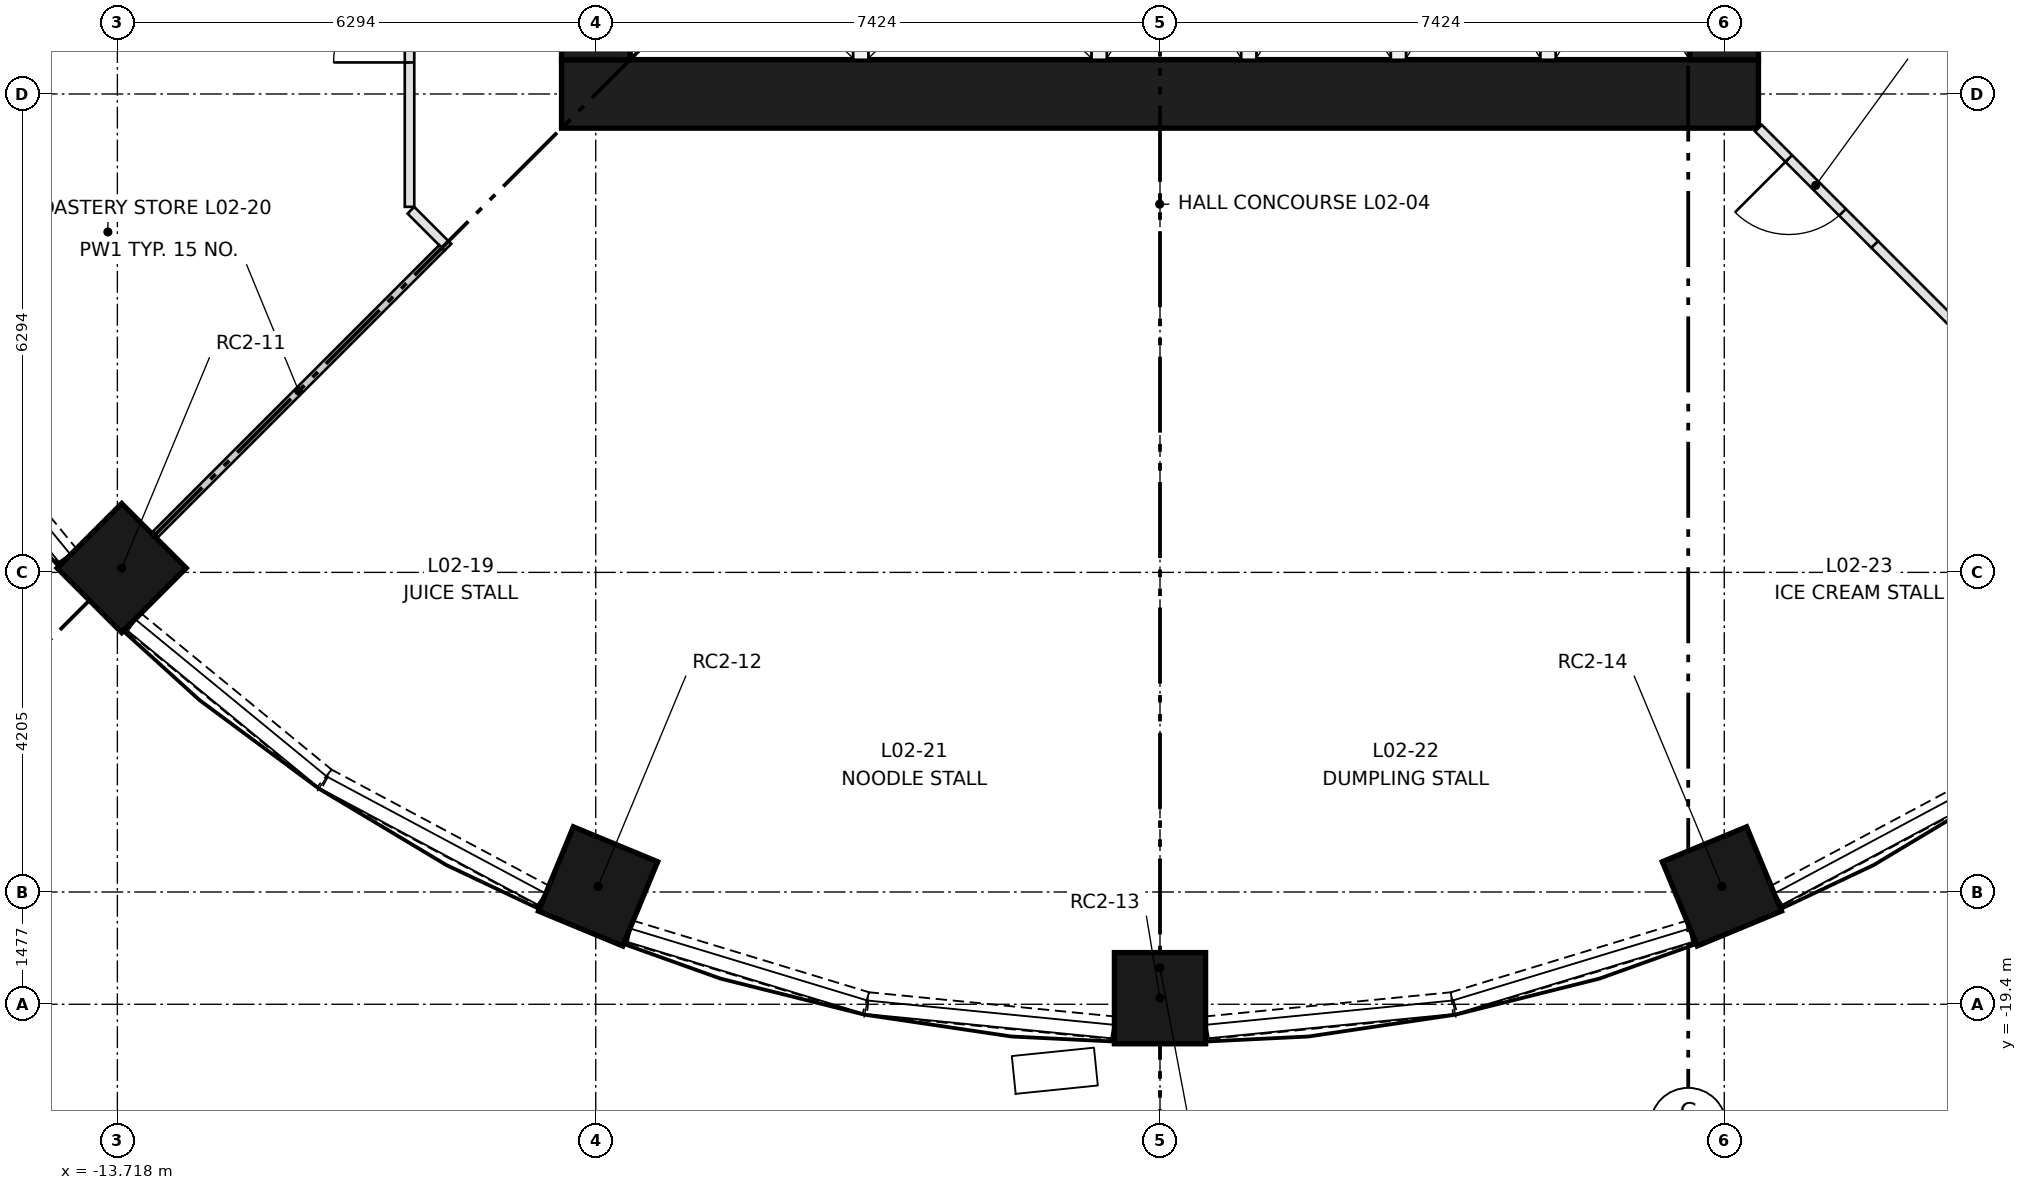
"""IFC4 building model, lengths in metres.
Left out: names, types, materials, properties, quantities, classifications, styles, units other than length and angle.
Written with IfcOpenShell. Run it as: python <this file> out.ifc"""

import sys

from ifc_helpers import new_model, si_unit, direction, frame, frame_2d, origin, origin_2d, place, context, subcontext, project, spatial, rectangle, extrude, element, fill, save


model = new_model("IFC4")
c1 = context("Model", 3, precision=1e-05, world=origin(), true_north=direction((0.0, 1.0)))
c2 = subcontext(c1, "Body", "Model", "MODEL_VIEW")
j1 = project(units=[si_unit("LENGTHUNIT", "METRE"), si_unit("PLANEANGLEUNIT", "RADIAN")], contexts=[c1])
p1 = place(None, origin())
s1 = spatial("IfcSite", under=j1, at=p1, CompositionType="ELEMENT")
p2 = place(p1, origin())
s2 = spatial("IfcBuilding", under=s1, at=p2, CompositionType="ELEMENT")
p3 = place(p2, frame((0.0, 0.0, 9.9)))
s3 = spatial("IfcBuildingStorey", under=s2, at=p3, CompositionType="ELEMENT", Elevation=9.9)
for number, where, z_axis, x_axis in (
    (1, (-13.661, -13.661, 0.0), (0.0, 0.0, 1.0), (-0.707, -0.707, 0.0)),
    (2, (-7.394, -17.849, 0.0), (0.0, 0.0, 1.0), (-0.383, -0.924, 0.0)),
    (3, (0.0, -19.32, 0.0), (0.0, 0.0, 1.0), (0.0, -1.0, 0.0)),
    (4, (7.394, -17.849, 0.0), (0.0, 0.0, 1.0), (0.383, -0.924, 0.0)),
):
    element("IfcColumn", number, at=place(p3, frame(where, z_axis=z_axis, x_axis=x_axis)), inside=s3, PredefinedType="COLUMN", context=c2, shape_type="SweptSolid", body=[
        extrude(rectangle(XDim=1.2, YDim=1.2, at=origin_2d()), origin(), (0.0, 0.0, 1.0), 4.5),
    ])
p4 = place(p3, frame((-7.874, -7.424, 0.0), z_axis=(0.0, 0.0, 1.0), x_axis=(1.0, 0.0, 0.0)))
e5 = element("IfcWall", 5, at=p4, inside=s3, PredefinedType="SHEAR", context=c2, shape_type="SweptSolid", body=[
    extrude(rectangle(XDim=15.748, YDim=0.9, at=frame_2d((7.874, 0.0))), origin(), (0.0, 0.0, 1.0), 4.5),
])
p5 = place(p3, frame((-7.424, -6.974, 0.0), z_axis=(0.0, 0.0, 1.0), x_axis=(0.0, 1.0, 0.0)))
e6 = element("IfcWall", 6, at=p5, inside=s3, PredefinedType="SHEAR", context=c2, shape_type="SweptSolid", body=[
    extrude(rectangle(XDim=13.948, YDim=0.9, at=frame_2d((6.974, 0.0))), origin(), (0.0, 0.0, 1.0), 4.5),
])
p6 = place(p5, frame((6.474, 0.0, 0.0)))
e7 = element("IfcOpeningElement", 7, at=p6, cuts=e6, PredefinedType="OPENING", context=c2, shape_type="SweptSolid", body=[
    extrude(rectangle(XDim=1.0, YDim=2.1, at=frame_2d((0.5, 1.05))), frame((0.0, 0.46, 0.0), z_axis=(0.0, -1.0, 0.0), x_axis=(1.0, 0.0, 0.0)), (0.0, 0.0, 1.0), 0.92),
])
p7 = place(p5, frame((3.35, 0.0, 0.0)))
e8 = element("IfcOpeningElement", 8, at=p7, cuts=e6, PredefinedType="OPENING", context=c2, shape_type="SweptSolid", body=[
    extrude(rectangle(XDim=1.8, YDim=2.1, at=frame_2d((0.9, 1.05))), frame((0.0, 0.46, 0.0), z_axis=(0.0, -1.0, 0.0), x_axis=(1.0, 0.0, 0.0)), (0.0, 0.0, 1.0), 0.92),
])
p8 = place(p5, frame((8.799, 0.0, 0.0)))
e9 = element("IfcOpeningElement", 9, at=p8, cuts=e6, PredefinedType="OPENING", context=c2, shape_type="SweptSolid", body=[
    extrude(rectangle(XDim=1.8, YDim=2.1, at=frame_2d((0.9, 1.05))), frame((0.0, 0.46, 0.0), z_axis=(0.0, -1.0, 0.0), x_axis=(1.0, 0.0, 0.0)), (0.0, 0.0, 1.0), 0.92),
])
p9 = place(p5, frame((11.974, 0.0, 0.0)))
e10 = element("IfcOpeningElement", 10, at=p9, cuts=e6, PredefinedType="OPENING", context=c2, shape_type="SweptSolid", body=[
    extrude(rectangle(XDim=1.0, YDim=2.1, at=frame_2d((0.5, 1.05))), frame((0.0, 0.46, 0.0), z_axis=(0.0, -1.0, 0.0), x_axis=(1.0, 0.0, 0.0)), (0.0, 0.0, 1.0), 0.92),
])
p10 = place(p3, frame((7.424, -6.974, 0.0), z_axis=(0.0, 0.0, 1.0), x_axis=(0.0, 1.0, 0.0)))
e11 = element("IfcWall", 11, at=p10, inside=s3, PredefinedType="SHEAR", context=c2, shape_type="SweptSolid", body=[
    extrude(rectangle(XDim=13.948, YDim=0.9, at=frame_2d((6.974, 0.0))), origin(), (0.0, 0.0, 1.0), 4.5),
])
p11 = place(p10, frame((6.474, 0.0, 0.0)))
e12 = element("IfcOpeningElement", 12, at=p11, cuts=e11, PredefinedType="OPENING", context=c2, shape_type="SweptSolid", body=[
    extrude(rectangle(XDim=1.0, YDim=2.1, at=frame_2d((0.5, 1.05))), frame((0.0, 0.46, 0.0), z_axis=(0.0, -1.0, 0.0), x_axis=(1.0, 0.0, 0.0)), (0.0, 0.0, 1.0), 0.92),
])
p12 = place(p10, frame((3.35, 0.0, 0.0)))
e13 = element("IfcOpeningElement", 13, at=p12, cuts=e11, PredefinedType="OPENING", context=c2, shape_type="SweptSolid", body=[
    extrude(rectangle(XDim=1.8, YDim=2.1, at=frame_2d((0.9, 1.05))), frame((0.0, 0.46, 0.0), z_axis=(0.0, -1.0, 0.0), x_axis=(1.0, 0.0, 0.0)), (0.0, 0.0, 1.0), 0.92),
])
p13 = place(p10, frame((8.799, 0.0, 0.0)))
e14 = element("IfcOpeningElement", 14, at=p13, cuts=e11, PredefinedType="OPENING", context=c2, shape_type="SweptSolid", body=[
    extrude(rectangle(XDim=1.8, YDim=2.1, at=frame_2d((0.9, 1.05))), frame((0.0, 0.46, 0.0), z_axis=(0.0, -1.0, 0.0), x_axis=(1.0, 0.0, 0.0)), (0.0, 0.0, 1.0), 0.92),
])
for number, where, z_axis, x_axis in (
    (15, (-3.937, -6.974, 0.0), (0.0, 0.0, 1.0), (0.0, 1.0, 0.0)),
    (16, (-0.8, -6.974, 0.0), (0.0, 0.0, 1.0), (0.0, 1.0, 0.0)),
    (17, (1.168, -6.974, 0.0), (0.0, 0.0, 1.0), (0.0, 1.0, 0.0)),
    (18, (3.137, -6.974, 0.0), (0.0, 0.0, 1.0), (0.0, 1.0, 0.0)),
    (19, (5.105, -6.974, 0.0), (0.0, 0.0, 1.0), (0.0, 1.0, 0.0)),
):
    element("IfcWall", number, at=place(p3, frame(where, z_axis=z_axis, x_axis=x_axis)), inside=s3, PredefinedType="PARTITIONING", context=c2, shape_type="SweptSolid", body=[
        extrude(rectangle(XDim=2.8, YDim=0.2, at=frame_2d((1.4, 0.0))), origin(), (0.0, 0.0, 1.0), 4.1),
    ])
for number, where, z_axis, x_axis in (
    (20, (-16.428, -10.995, 0.0), (0.0, 0.0, 1.0), (0.634, -0.773, 0.0)),
    (21, (-13.503, -14.371, 0.0), (0.0, 0.0, 1.0), (0.773, -0.634, 0.0)),
):
    element("IfcWall", number, at=place(p3, frame(where, z_axis=z_axis, x_axis=x_axis)), inside=s3, PredefinedType="SOLIDWALL", context=c2, shape_type="SweptSolid", body=[
        extrude(rectangle(XDim=3.245, YDim=0.3, at=frame_2d((1.623, 0.0))), origin(), (0.0, 0.0, 1.0), 0.45),
    ])
p14 = place(p3, frame((-10.97, -16.445, 0.0), z_axis=(0.0, 0.0, 1.0), x_axis=(0.882015257196, -0.471220846392, 0.0)))
e22 = element("IfcWall", 22, at=p14, inside=s3, PredefinedType="SOLIDWALL", context=c2, shape_type="SweptSolid", body=[
    extrude(rectangle(XDim=3.244, YDim=0.3, at=frame_2d((1.622, 0.0))), origin(), (0.0, 0.0, 1.0), 0.45),
])
p15 = place(p3, frame((-6.976, -18.443, 0.0), z_axis=(0.0, 0.0, 1.0), x_axis=(0.95689962518, -0.290418848098, 0.0)))
e23 = element("IfcWall", 23, at=p15, inside=s3, PredefinedType="SOLIDWALL", context=c2, shape_type="SweptSolid", body=[
    extrude(rectangle(XDim=3.244, YDim=0.3, at=frame_2d((1.622, 0.0))), origin(), (0.0, 0.0, 1.0), 0.45),
])
for number, where, z_axis, x_axis in (
    (24, (-3.842, -19.392, 0.0), (0.0, 0.0, 1.0), (0.995, -0.098, 0.0)),
    (25, (0.613, -19.709, 0.0), (0.0, 0.0, 1.0), (0.995, 0.098, 0.0)),
):
    element("IfcWall", number, at=place(p3, frame(where, z_axis=z_axis, x_axis=x_axis)), inside=s3, PredefinedType="SOLIDWALL", context=c2, shape_type="SweptSolid", body=[
        extrude(rectangle(XDim=3.245, YDim=0.3, at=frame_2d((1.623, 0.0))), origin(), (0.0, 0.0, 1.0), 0.45),
    ])
p16 = place(p3, frame((3.871, -19.385, 0.0), z_axis=(0.0, 0.0, 1.0), x_axis=(0.95689962518, 0.290418848098, 0.0)))
e26 = element("IfcWall", 26, at=p16, inside=s3, PredefinedType="SOLIDWALL", context=c2, shape_type="SweptSolid", body=[
    extrude(rectangle(XDim=3.244, YDim=0.3, at=frame_2d((1.622, 0.0))), origin(), (0.0, 0.0, 1.0), 0.45),
])
p17 = place(p3, frame((8.108, -17.974, 0.0), z_axis=(0.0, 0.0, 1.0), x_axis=(0.882015257196, 0.471220846392, 0.0)))
e27 = element("IfcWall", 27, at=p17, inside=s3, PredefinedType="SOLIDWALL", context=c2, shape_type="SweptSolid", body=[
    extrude(rectangle(XDim=3.244, YDim=0.3, at=frame_2d((1.622, 0.0))), origin(), (0.0, 0.0, 1.0), 0.45),
])
p18 = place(p3, frame((9.405, -9.405, 0.0), z_axis=(0.0, 0.0, 1.0), x_axis=(-0.707106781187, 0.707106781187, 0.0)))
e28 = element("IfcWall", 28, at=p18, inside=s3, PredefinedType="PARTITIONING", context=c2, shape_type="SweptSolid", body=[
    extrude(rectangle(XDim=2.165, YDim=0.125, at=frame_2d((1.082, 0.0))), origin(), (0.0, 0.0, 1.0), 4.1),
])
p19 = place(p18, frame((0.6, 0.0, 0.0)))
e29 = element("IfcOpeningElement", 29, at=p19, cuts=e28, PredefinedType="OPENING", context=c2, shape_type="SweptSolid", body=[
    extrude(rectangle(XDim=1.0, YDim=2.1, at=frame_2d((0.5, 1.05))), frame((0.0, 0.073, 0.0), z_axis=(0.0, -1.0, 0.0), x_axis=(1.0, 0.0, 0.0)), (0.0, 0.0, 1.0), 0.145),
])
p20 = place(p3, frame((-9.874, -8.909, 0.0), z_axis=(0.0, 0.0, 1.0), x_axis=(0.0, 1.0, 0.0)))
e30 = element("IfcWall", 30, at=p20, inside=s3, PredefinedType="PARTITIONING", context=c2, shape_type="SweptSolid", body=[
    extrude(rectangle(XDim=4.819, YDim=0.125, at=frame_2d((2.41, 0.0))), origin(), (0.0, 0.0, 1.0), 4.1),
])
p21 = place(p20, frame((1.9, 0.0, 0.0)))
e31 = element("IfcOpeningElement", 31, at=p21, cuts=e30, PredefinedType="OPENING", context=c2, shape_type="SweptSolid", body=[
    extrude(rectangle(XDim=1.0, YDim=2.1, at=frame_2d((0.5, 1.05))), frame((0.0, 0.073, 0.0), z_axis=(0.0, -1.0, 0.0), x_axis=(1.0, 0.0, 0.0)), (0.0, 0.0, 1.0), 0.145),
])
p22 = place(p3, frame((-9.369, -9.44, 0.0), z_axis=(0.0, 0.0, 1.0), x_axis=(-0.707106781187, 0.707106781187, 0.0)))
e32 = element("IfcWall", 32, at=p22, inside=s3, PredefinedType="PARTITIONING", context=c2, shape_type="SweptSolid", body=[
    extrude(rectangle(XDim=0.688, YDim=0.125, at=frame_2d((0.344, 0.0))), origin(), (0.0, 0.0, 1.0), 4.1),
])
p23 = place(p3, frame((-13.692, -5.671, 0.0), z_axis=(0.0, 0.0, 1.0), x_axis=(-0.923883048049, -0.382674944996, 0.0)))
e33 = element("IfcWall", 33, at=p23, inside=s3, PredefinedType="PARTITIONING", context=c2, shape_type="SweptSolid", body=[
    extrude(rectangle(XDim=3.87, YDim=0.11, at=frame_2d((1.935, 0.0))), origin(), (0.0, 0.0, 1.0), 4.1),
])
p24 = place(p3, frame((-13.216, -13.216, 0.0), z_axis=(0.0, 0.0, 1.0), x_axis=(0.707106781187, 0.707106781187, 0.0)))
e34 = element("IfcWall", 34, at=p24, inside=s3, PredefinedType="PARTITIONING", context=c2, shape_type="SweptSolid", body=[
    extrude(rectangle(XDim=5.327, YDim=0.1, at=frame_2d((2.664, 0.0))), origin(), (0.0, 0.0, 1.0), 4.1),
])
p25 = place(p3, frame((9.405, -9.405, 0.0), z_axis=(0.0, 0.0, 1.0), x_axis=(0.707106781187, -0.707106781187, 0.0)))
e35 = element("IfcWall", 35, at=p25, inside=s3, PredefinedType="PARTITIONING", context=c2, shape_type="SweptSolid", body=[
    extrude(rectangle(XDim=5.39, YDim=0.125, at=frame_2d((2.695, 0.0))), origin(), (0.0, 0.0, 1.0), 4.1),
])
p26 = place(p19, origin())
e36 = element("IfcDoor", 36, at=p26, inside=s3, OperationType="SINGLE_SWING_RIGHT", PredefinedType="DOOR", context=c2, shape_type="SweptSolid", body=[
    extrude(rectangle(XDim=1.0, YDim=2.1, at=frame_2d((0.5, 1.05))), frame((0.0, 0.025, 0.0), z_axis=(0.0, -1.0, 0.0), x_axis=(1.0, 0.0, 0.0)), (0.0, 0.0, 1.0), 0.05),
])
fill(e29, e36)
p27 = place(p21, origin())
e37 = element("IfcDoor", 37, at=p27, inside=s3, OperationType="SINGLE_SWING_LEFT", PredefinedType="DOOR", context=c2, shape_type="SweptSolid", body=[
    extrude(rectangle(XDim=1.0, YDim=2.1, at=frame_2d((0.5, 1.05))), frame((0.0, 0.025, 0.0), z_axis=(0.0, -1.0, 0.0), x_axis=(1.0, 0.0, 0.0)), (0.0, 0.0, 1.0), 0.05),
])
fill(e31, e37)
save(model, sys.argv[1])
